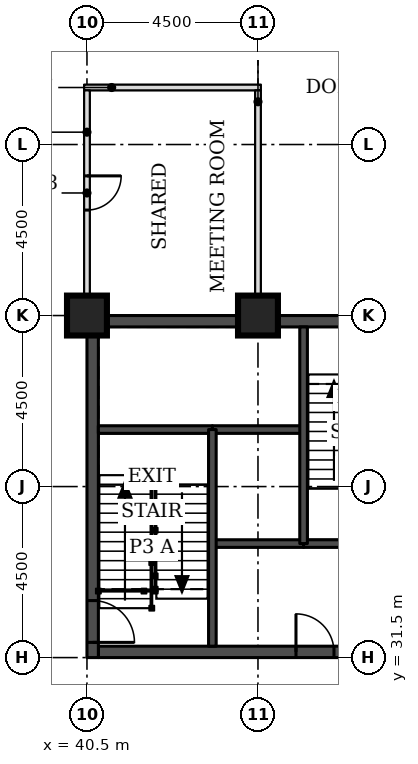
"""IFC4 building model, lengths in metres.
Left out: names, types, materials, properties, quantities, classifications, styles, units other than length and angle.
Written with IfcOpenShell. Run it as: python <this file> out.ifc"""

import sys

from ifc_helpers import new_model, si_unit, direction, frame, frame_2d, origin, origin_2d, place, context, subcontext, project, spatial, rectangle, extrude, element, fill, save


model = new_model("IFC4")
c1 = context("Model", 3, precision=1e-05, world=origin(), true_north=direction((0.0, 1.0)))
c2 = subcontext(c1, "Body", "Model", "MODEL_VIEW")
j1 = project(units=[si_unit("LENGTHUNIT", "METRE"), si_unit("PLANEANGLEUNIT", "RADIAN")], contexts=[c1])
p1 = place(None, origin())
s1 = spatial("IfcSite", under=j1, at=p1, CompositionType="ELEMENT")
p2 = place(p1, origin())
s2 = spatial("IfcBuilding", under=s1, at=p2, CompositionType="ELEMENT")
p3 = place(p2, frame((0.0, 0.0, 108.5)))
s3 = spatial("IfcBuildingStorey", under=s2, at=p3, CompositionType="ELEMENT", Elevation=108.5)
for number, where, z_axis, x_axis in (
    (1, (40.5, 40.5, 0.0), (0.0, 0.0, 1.0), (1.0, 0.0, 0.0)),
    (2, (45.0, 40.5, 0.0), (0.0, 0.0, 1.0), (1.0, 0.0, 0.0)),
):
    element("IfcColumn", number, at=place(p3, frame(where, z_axis=z_axis, x_axis=x_axis)), inside=s3, PredefinedType="COLUMN", context=c2, shape_type="SweptSolid", body=[
        extrude(rectangle(XDim=1.05, YDim=1.05, at=origin_2d()), origin(), (0.0, 0.0, 1.0), 3.7),
    ])
p4 = place(p3, frame((40.8, 31.65, 0.0), z_axis=(0.0, 0.0, 1.0), x_axis=(1.0, 0.0, 0.0)))
e3 = element("IfcWall", 3, at=p4, inside=s3, PredefinedType="SHEAR", context=c2, shape_type="SweptSolid", body=[
    extrude(rectangle(XDim=8.4, YDim=0.3, at=frame_2d((4.2, 0.0))), origin(), (0.0, 0.0, 1.0), 3.7),
])
p5 = place(p4, frame((5.2, 0.0, 0.0)))
e4 = element("IfcOpeningElement", 4, at=p5, cuts=e3, PredefinedType="OPENING", context=c2, shape_type="SweptSolid", body=[
    extrude(rectangle(XDim=1.0, YDim=2.1, at=frame_2d((0.5, 1.05))), frame((0.0, 0.16, 0.0), z_axis=(0.0, -1.0, 0.0), x_axis=(1.0, 0.0, 0.0)), (0.0, 0.0, 1.0), 0.32),
])
p6 = place(p3, frame((40.8, 40.35, 0.0), z_axis=(0.0, 0.0, 1.0), x_axis=(1.0, 0.0, 0.0)))
e5 = element("IfcWall", 5, at=p6, inside=s3, PredefinedType="SHEAR", context=c2, shape_type="SweptSolid", body=[
    extrude(rectangle(XDim=8.4, YDim=0.3, at=frame_2d((4.2, 0.0))), origin(), (0.0, 0.0, 1.0), 3.7),
])
p7 = place(p6, frame((6.4, 0.0, 0.0)))
e6 = element("IfcOpeningElement", 6, at=p7, cuts=e5, PredefinedType="OPENING", context=c2, shape_type="SweptSolid", body=[
    extrude(rectangle(XDim=1.1, YDim=2.1, at=frame_2d((0.55, 1.05))), frame((0.0, 0.16, 0.0), z_axis=(0.0, -1.0, 0.0), x_axis=(1.0, 0.0, 0.0)), (0.0, 0.0, 1.0), 0.32),
])
p8 = place(p3, frame((40.65, 31.5, 0.0), z_axis=(0.0, 0.0, 1.0), x_axis=(0.0, 1.0, 0.0)))
e7 = element("IfcWall", 7, at=p8, inside=s3, PredefinedType="SHEAR", context=c2, shape_type="SweptSolid", body=[
    extrude(rectangle(XDim=9.0, YDim=0.3, at=frame_2d((4.5, 0.0))), origin(), (0.0, 0.0, 1.0), 3.7),
])
p9 = place(p8, frame((0.4, 0.0, 0.0)))
e8 = element("IfcOpeningElement", 8, at=p9, cuts=e7, PredefinedType="OPENING", context=c2, shape_type="SweptSolid", body=[
    extrude(rectangle(XDim=1.1, YDim=2.1, at=frame_2d((0.55, 1.05))), frame((0.0, 0.16, 0.0), z_axis=(0.0, -1.0, 0.0), x_axis=(1.0, 0.0, 0.0)), (0.0, 0.0, 1.0), 0.32),
])
p10 = place(p3, frame((40.425, 46.5, 0.0), z_axis=(0.0, 0.0, 1.0), x_axis=(1.0, 0.0, 0.0)))
e9 = element("IfcWall", 9, at=p10, inside=s3, PredefinedType="PARTITIONING", context=c2, shape_type="SweptSolid", body=[
    extrude(rectangle(XDim=4.65, YDim=0.15, at=frame_2d((2.325, 0.0))), origin(), (0.0, 0.0, 1.0), 3.55),
])
p11 = place(p3, frame((40.5, 41.025, 0.0), z_axis=(0.0, 0.0, 1.0), x_axis=(0.0, 1.0, 0.0)))
e10 = element("IfcWall", 10, at=p11, inside=s3, PredefinedType="PARTITIONING", context=c2, shape_type="SweptSolid", body=[
    extrude(rectangle(XDim=5.4, YDim=0.15, at=frame_2d((2.7, 0.0))), origin(), (0.0, 0.0, 1.0), 3.55),
])
p12 = place(p11, frame((2.25, 0.0, 0.0)))
e11 = element("IfcOpeningElement", 11, at=p12, cuts=e10, PredefinedType="OPENING", context=c2, shape_type="SweptSolid", body=[
    extrude(rectangle(XDim=0.9, YDim=2.1, at=frame_2d((0.45, 1.05))), frame((0.0, 0.085, 0.0), z_axis=(0.0, -1.0, 0.0), x_axis=(1.0, 0.0, 0.0)), (0.0, 0.0, 1.0), 0.17),
])
p13 = place(p3, frame((45.0, 41.025, 0.0), z_axis=(0.0, 0.0, 1.0), x_axis=(0.0, 1.0, 0.0)))
e12 = element("IfcWall", 12, at=p13, inside=s3, PredefinedType="PARTITIONING", context=c2, shape_type="SweptSolid", body=[
    extrude(rectangle(XDim=5.4, YDim=0.15, at=frame_2d((2.7, 0.0))), origin(), (0.0, 0.0, 1.0), 3.55),
])
p14 = place(p3, frame((43.8, 34.5, 0.0), z_axis=(0.0, 0.0, 1.0), x_axis=(1.0, 0.0, 0.0)))
e13 = element("IfcWall", 13, at=p14, inside=s3, PredefinedType="SOLIDWALL", context=c2, shape_type="SweptSolid", body=[
    extrude(rectangle(XDim=2.4, YDim=0.2, at=frame_2d((1.2, 0.0))), origin(), (0.0, 0.0, 1.0), 3.55),
])
p15 = place(p3, frame((46.2, 34.5, 0.0), z_axis=(0.0, 0.0, 1.0), x_axis=(1.0, 0.0, 0.0)))
e14 = element("IfcWall", 14, at=p15, inside=s3, PredefinedType="SOLIDWALL", context=c2, shape_type="SweptSolid", body=[
    extrude(rectangle(XDim=3.0, YDim=0.2, at=frame_2d((1.5, 0.0))), origin(), (0.0, 0.0, 1.0), 3.55),
])
p16 = place(p3, frame((43.8, 37.5, 0.0), z_axis=(0.0, 0.0, 1.0), x_axis=(1.0, 0.0, 0.0)))
e15 = element("IfcWall", 15, at=p16, inside=s3, PredefinedType="SOLIDWALL", context=c2, shape_type="SweptSolid", body=[
    extrude(rectangle(XDim=2.4, YDim=0.2, at=frame_2d((1.2, 0.0))), origin(), (0.0, 0.0, 1.0), 3.7),
])
p17 = place(p3, frame((40.8, 37.5, 0.0), z_axis=(0.0, 0.0, 1.0), x_axis=(1.0, 0.0, 0.0)))
e16 = element("IfcWall", 16, at=p17, inside=s3, PredefinedType="SOLIDWALL", context=c2, shape_type="SweptSolid", body=[
    extrude(rectangle(XDim=3.0, YDim=0.2, at=frame_2d((1.5, 0.0))), origin(), (0.0, 0.0, 1.0), 3.55),
])
for number, where, z_axis, x_axis in (
    (17, (43.8, 31.8, 0.0), (0.0, 0.0, 1.0), (0.0, 1.0, 0.0)),
    (18, (46.2, 34.5, 0.0), (0.0, 0.0, 1.0), (0.0, 1.0, 0.0)),
):
    element("IfcWall", number, at=place(p3, frame(where, z_axis=z_axis, x_axis=x_axis)), inside=s3, PredefinedType="SOLIDWALL", context=c2, shape_type="SweptSolid", body=[
        extrude(rectangle(XDim=5.7, YDim=0.2, at=frame_2d((2.85, 0.0))), origin(), (0.0, 0.0, 1.0), 3.55),
    ])
p18 = place(p12, frame((0.9, 0.0, 0.0), z_axis=(0.0, 0.0, 1.0), x_axis=(-1.0, 0.0, 0.0)))
e19 = element("IfcDoor", 19, at=p18, inside=s3, OperationType="SINGLE_SWING_LEFT", PredefinedType="DOOR", context=c2, shape_type="SweptSolid", body=[
    extrude(rectangle(XDim=0.9, YDim=2.1, at=frame_2d((0.45, 1.05))), frame((0.0, 0.025, 0.0), z_axis=(0.0, -1.0, 0.0), x_axis=(1.0, 0.0, 0.0)), (0.0, 0.0, 1.0), 0.05),
])
fill(e11, e19)
p19 = place(p9, frame((1.1, 0.0, 0.0), z_axis=(0.0, 0.0, 1.0), x_axis=(-1.0, 0.0, 0.0)))
e20 = element("IfcDoor", 20, at=p19, inside=s3, OperationType="SINGLE_SWING_RIGHT", PredefinedType="DOOR", context=c2, shape_type="SweptSolid", body=[
    extrude(rectangle(XDim=1.1, YDim=2.1, at=frame_2d((0.55, 1.05))), frame((0.0, 0.025, 0.0), z_axis=(0.0, -1.0, 0.0), x_axis=(1.0, 0.0, 0.0)), (0.0, 0.0, 1.0), 0.05),
])
fill(e8, e20)
p20 = place(p5, origin())
e21 = element("IfcDoor", 21, at=p20, inside=s3, OperationType="SINGLE_SWING_LEFT", PredefinedType="DOOR", context=c2, shape_type="SweptSolid", body=[
    extrude(rectangle(XDim=1.0, YDim=2.1, at=frame_2d((0.5, 1.05))), frame((0.0, 0.025, 0.0), z_axis=(0.0, -1.0, 0.0), x_axis=(1.0, 0.0, 0.0)), (0.0, 0.0, 1.0), 0.05),
])
fill(e4, e21)
save(model, sys.argv[1])
